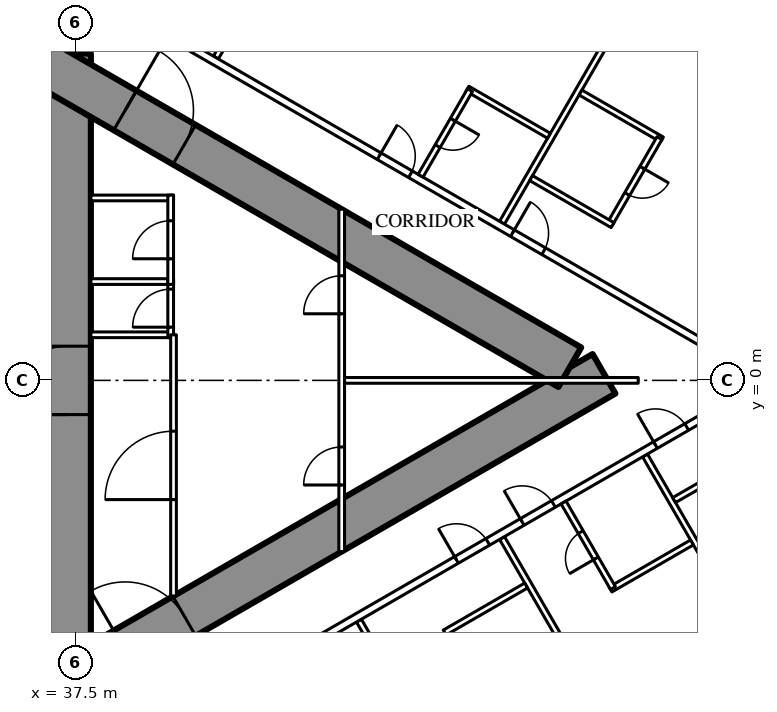
"""IFC4 building model, lengths in metres.
Left out: names, types, materials, properties, quantities, classifications, styles, units other than length and angle.
Written with IfcOpenShell. Run it as: python <this file> out.ifc"""

import sys

from ifc_helpers import new_model, si_unit, direction, frame, frame_2d, origin, place, context, subcontext, project, spatial, rectangle, extrude, element, fill, save


model = new_model("IFC4")
c1 = context("Model", 3, precision=1e-05, world=origin(), true_north=direction((0.0, 1.0)))
c2 = subcontext(c1, "Body", "Model", "MODEL_VIEW")
j1 = project(units=[si_unit("LENGTHUNIT", "METRE"), si_unit("PLANEANGLEUNIT", "RADIAN")], contexts=[c1])
p1 = place(None, origin())
s1 = spatial("IfcSite", under=j1, at=p1, CompositionType="ELEMENT")
p2 = place(p1, origin())
s2 = spatial("IfcBuilding", under=s1, at=p2, CompositionType="ELEMENT")
p3 = place(p2, frame((0.0, 0.0, 94.1)))
s3 = spatial("IfcBuildingStorey", under=s2, at=p3, CompositionType="ELEMENT", Elevation=94.1)
p4 = place(p3, frame((37.3, -8.6, 0.0), z_axis=(0.0, 0.0, 1.0), x_axis=(0.0, 1.0, 0.0)))
e1 = element("IfcWall", 1, at=p4, inside=s3, PredefinedType="SHEAR", context=c2, shape_type="SweptSolid", body=[
    extrude(rectangle(XDim=17.2, YDim=1.2, at=frame_2d((8.6, 0.0))), origin(), (0.0, 0.0, 1.0), 3.5),
])
p5 = place(p4, frame((7.7, 0.0, 0.0)))
e2 = element("IfcOpeningElement", 2, at=p5, cuts=e1, PredefinedType="OPENING", context=c2, shape_type="SweptSolid", body=[
    extrude(rectangle(XDim=1.8, YDim=2.2, at=frame_2d((0.9, 1.1))), frame((0.0, 0.61, 0.0), z_axis=(0.0, -1.0, 0.0), x_axis=(1.0, 0.0, 0.0)), (0.0, 0.0, 1.0), 1.22),
])
p6 = place(p3, frame((27.2, -13.8, 0.0), z_axis=(0.0, 0.0, 1.0), x_axis=(0.866027159892, 0.499996958321, 0.0)))
e3 = element("IfcWall", 3, at=p6, inside=s3, PredefinedType="SHEAR", context=c2, shape_type="SweptSolid", body=[
    extrude(rectangle(XDim=27.947, YDim=1.2, at=frame_2d((13.973, 0.0))), origin(), (0.0, 0.0, 1.0), 3.5),
])
p7 = place(p6, frame((4.6, 0.0, 0.0)))
e4 = element("IfcOpeningElement", 4, at=p7, cuts=e3, PredefinedType="OPENING", context=c2, shape_type="SweptSolid", body=[
    extrude(rectangle(XDim=1.0, YDim=2.2, at=frame_2d((0.5, 1.1))), frame((0.0, 0.61, 0.0), z_axis=(0.0, -1.0, 0.0), x_axis=(1.0, 0.0, 0.0)), (0.0, 0.0, 1.0), 1.22),
])
p8 = place(p6, frame((13.395, 0.0, 0.0)))
e5 = element("IfcOpeningElement", 5, at=p8, cuts=e3, PredefinedType="OPENING", context=c2, shape_type="SweptSolid", body=[
    extrude(rectangle(XDim=1.8, YDim=2.2, at=frame_2d((0.9, 1.1))), frame((0.0, 0.61, 0.0), z_axis=(0.0, -1.0, 0.0), x_axis=(1.0, 0.0, 0.0)), (0.0, 0.0, 1.0), 1.22),
])
p9 = place(p3, frame((27.2, 13.8, 0.0), z_axis=(0.0, 0.0, 1.0), x_axis=(0.866024515034, -0.500001539357, 0.0)))
e6 = element("IfcWall", 6, at=p9, inside=s3, PredefinedType="SHEAR", context=c2, shape_type="SweptSolid", body=[
    extrude(rectangle(XDim=26.907, YDim=1.2, at=frame_2d((13.454, 0.0))), origin(), (0.0, 0.0, 1.0), 3.5),
])
p10 = place(p9, frame((4.6, 0.0, 0.0)))
e7 = element("IfcOpeningElement", 7, at=p10, cuts=e6, PredefinedType="OPENING", context=c2, shape_type="SweptSolid", body=[
    extrude(rectangle(XDim=1.0, YDim=2.2, at=frame_2d((0.5, 1.1))), frame((0.0, 0.61, 0.0), z_axis=(0.0, -1.0, 0.0), x_axis=(1.0, 0.0, 0.0)), (0.0, 0.0, 1.0), 1.22),
])
p11 = place(p9, frame((13.395, 0.0, 0.0)))
e8 = element("IfcOpeningElement", 8, at=p11, cuts=e6, PredefinedType="OPENING", context=c2, shape_type="SweptSolid", body=[
    extrude(rectangle(XDim=1.8, YDim=2.2, at=frame_2d((0.9, 1.1))), frame((0.0, 0.61, 0.0), z_axis=(0.0, -1.0, 0.0), x_axis=(1.0, 0.0, 0.0)), (0.0, 0.0, 1.0), 1.22),
])
p12 = place(p3, frame((44.954, -6.321, 0.0), z_axis=(0.0, 0.0, 1.0), x_axis=(0.500018676722, -0.866014620505, 0.0)))
e9 = element("IfcWall", 9, at=p12, inside=s3, PredefinedType="PARTITIONING", context=c2, shape_type="SweptSolid", body=[
    extrude(rectangle(XDim=8.704, YDim=0.15, at=frame_2d((4.352, 0.0))), origin(), (0.0, 0.0, 1.0), 2.2),
])
p13 = place(p3, frame((48.719, -4.147, 0.0), z_axis=(0.0, 0.0, 1.0), x_axis=(0.499990498062, -0.866030889661, 0.0)))
e10 = element("IfcWall", 10, at=p13, inside=s3, PredefinedType="PARTITIONING", context=c2, shape_type="SweptSolid", body=[
    extrude(rectangle(XDim=11.406, YDim=0.15, at=frame_2d((5.703, 0.0))), origin(), (0.0, 0.0, 1.0), 3.25),
])
p14 = place(p3, frame((52.481, -1.975, 0.0), z_axis=(0.0, 0.0, 1.0), x_axis=(0.500003867771, -0.866023170714, 0.0)))
e11 = element("IfcWall", 11, at=p14, inside=s3, PredefinedType="PARTITIONING", context=c2, shape_type="SweptSolid", body=[
    extrude(rectangle(XDim=11.265, YDim=0.15, at=frame_2d((5.632, 0.0))), origin(), (0.0, 0.0, 1.0), 3.25),
])
p15 = place(p3, frame((41.19, 8.494, 0.0), z_axis=(0.0, 0.0, 1.0), x_axis=(0.49999258054, 0.866029687369, 0.0)))
e12 = element("IfcWall", 12, at=p15, inside=s3, PredefinedType="PARTITIONING", context=c2, shape_type="SweptSolid", body=[
    extrude(rectangle(XDim=11.318, YDim=0.15, at=frame_2d((5.659, 0.0))), origin(), (0.0, 0.0, 1.0), 3.25),
])
p16 = place(p3, frame((48.719, 4.147, 0.0), z_axis=(0.0, 0.0, 1.0), x_axis=(0.499993328235, 0.866029255696, 0.0)))
e13 = element("IfcWall", 13, at=p16, inside=s3, PredefinedType="PARTITIONING", context=c2, shape_type="SweptSolid", body=[
    extrude(rectangle(XDim=8.686, YDim=0.15, at=frame_2d((4.343, 0.0))), origin(), (0.0, 0.0, 1.0), 2.2),
])
p17 = place(p3, frame((37.96, -10.243, 0.0), z_axis=(0.0, 0.0, 1.0), x_axis=(0.866026429433, 0.499998223521, 0.0)))
e14 = element("IfcWall", 14, at=p17, inside=s3, PredefinedType="PARTITIONING", context=c2, shape_type="SweptSolid", body=[
    extrude(rectangle(XDim=20.487, YDim=0.2, at=frame_2d((10.243, 0.0))), origin(), (0.0, 0.0, 1.0), 3.25),
])
p18 = place(p17, frame((4.047, 0.0, 0.0)))
e15 = element("IfcOpeningElement", 15, at=p18, cuts=e14, PredefinedType="OPENING", context=c2, shape_type="SweptSolid", body=[
    extrude(rectangle(XDim=0.95, YDim=2.2, at=frame_2d((0.475, 1.1))), frame((0.0, 0.11, 0.0), z_axis=(0.0, -1.0, 0.0), x_axis=(1.0, 0.0, 0.0)), (0.0, 0.0, 1.0), 0.22),
])
p19 = place(p17, frame((11.04, 0.0, 0.0)))
e16 = element("IfcOpeningElement", 16, at=p19, cuts=e14, PredefinedType="OPENING", context=c2, shape_type="SweptSolid", body=[
    extrude(rectangle(XDim=0.95, YDim=2.2, at=frame_2d((0.475, 1.1))), frame((0.0, 0.11, 0.0), z_axis=(0.0, -1.0, 0.0), x_axis=(1.0, 0.0, 0.0)), (0.0, 0.0, 1.0), 0.22),
])
p20 = place(p17, frame((13.035, 0.0, 0.0)))
e17 = element("IfcOpeningElement", 17, at=p20, cuts=e14, PredefinedType="OPENING", context=c2, shape_type="SweptSolid", body=[
    extrude(rectangle(XDim=0.95, YDim=2.2, at=frame_2d((0.475, 1.1))), frame((0.0, 0.11, 0.0), z_axis=(0.0, -1.0, 0.0), x_axis=(1.0, 0.0, 0.0)), (0.0, 0.0, 1.0), 0.22),
])
p21 = place(p17, frame((17.085, 0.0, 0.0)))
e18 = element("IfcOpeningElement", 18, at=p21, cuts=e14, PredefinedType="OPENING", context=c2, shape_type="SweptSolid", body=[
    extrude(rectangle(XDim=0.95, YDim=2.2, at=frame_2d((0.475, 1.1))), frame((0.0, 0.11, 0.0), z_axis=(0.0, -1.0, 0.0), x_axis=(1.0, 0.0, 0.0)), (0.0, 0.0, 1.0), 0.22),
])
p22 = place(p17, frame((1.048, 0.0, 0.0)))
e19 = element("IfcOpeningElement", 19, at=p22, cuts=e14, PredefinedType="OPENING", context=c2, shape_type="SweptSolid", body=[
    extrude(rectangle(XDim=1.8, YDim=2.2, at=frame_2d((0.9, 1.1))), frame((0.0, 0.11, 0.0), z_axis=(0.0, -1.0, 0.0), x_axis=(1.0, 0.0, 0.0)), (0.0, 0.0, 1.0), 0.22),
])
p23 = place(p3, frame((36.834, 10.894, 0.0), z_axis=(0.0, 0.0, 1.0), x_axis=(0.866028157229, -0.499995230863, 0.0)))
e20 = element("IfcWall", 20, at=p23, inside=s3, PredefinedType="PARTITIONING", context=c2, shape_type="SweptSolid", body=[
    extrude(rectangle(XDim=21.667, YDim=0.2, at=frame_2d((10.833, 0.0))), origin(), (0.0, 0.0, 1.0), 3.25),
])
p24 = place(p23, frame((14.04, 0.0, 0.0)))
e21 = element("IfcOpeningElement", 21, at=p24, cuts=e20, PredefinedType="OPENING", context=c2, shape_type="SweptSolid", body=[
    extrude(rectangle(XDim=0.95, YDim=2.2, at=frame_2d((0.475, 1.1))), frame((0.0, 0.11, 0.0), z_axis=(0.0, -1.0, 0.0), x_axis=(1.0, 0.0, 0.0)), (0.0, 0.0, 1.0), 0.22),
])
p25 = place(p23, frame((9.99, 0.0, 0.0)))
e22 = element("IfcOpeningElement", 22, at=p25, cuts=e20, PredefinedType="OPENING", context=c2, shape_type="SweptSolid", body=[
    extrude(rectangle(XDim=0.95, YDim=2.2, at=frame_2d((0.475, 1.1))), frame((0.0, 0.11, 0.0), z_axis=(0.0, -1.0, 0.0), x_axis=(1.0, 0.0, 0.0)), (0.0, 0.0, 1.0), 0.22),
])
p26 = place(p23, frame((3.35, 0.0, 0.0)))
e23 = element("IfcOpeningElement", 23, at=p26, cuts=e20, PredefinedType="OPENING", context=c2, shape_type="SweptSolid", body=[
    extrude(rectangle(XDim=1.0, YDim=2.2, at=frame_2d((0.5, 1.1))), frame((0.0, 0.11, 0.0), z_axis=(0.0, -1.0, 0.0), x_axis=(1.0, 0.0, 0.0)), (0.0, 0.0, 1.0), 0.22),
])
p27 = place(p3, frame((47.275, -6.597, 0.0), z_axis=(0.0, 0.0, 1.0), x_axis=(0.499936506574, -0.866062058628, 0.0)))
e24 = element("IfcWall", 24, at=p27, inside=s3, PredefinedType="PARTITIONING", context=c2, shape_type="SweptSolid", body=[
    extrude(rectangle(XDim=2.6, YDim=0.15, at=frame_2d((1.3, 0.0))), origin(), (0.0, 0.0, 1.0), 3.25),
])
p28 = place(p27, frame((0.9, 0.0, 0.0)))
e25 = element("IfcOpeningElement", 25, at=p28, cuts=e24, PredefinedType="OPENING", context=c2, shape_type="SweptSolid", body=[
    extrude(rectangle(XDim=0.8, YDim=2.2, at=frame_2d((0.4, 1.1))), frame((0.0, 0.085, 0.0), z_axis=(0.0, -1.0, 0.0), x_axis=(1.0, 0.0, 0.0)), (0.0, 0.0, 1.0), 0.17),
])
for number, where, z_axis, x_axis in (
    (26, (47.21, -6.635, 0.0), (0.0, 0.0, 1.0), (0.866, 0.5, 0.0)),
    (27, (51.573, -5.502, 0.0), (0.0, 0.0, 1.0), (0.866, 0.5, 0.0)),
):
    element("IfcWall", number, at=place(p3, frame(where, z_axis=z_axis, x_axis=x_axis)), inside=s3, PredefinedType="PARTITIONING", context=c2, shape_type="SweptSolid", body=[
        extrude(rectangle(XDim=2.475, YDim=0.15, at=frame_2d((1.237, 0.0))), origin(), (0.0, 0.0, 1.0), 3.25),
    ])
p29 = place(p3, frame((50.338, -3.213, 0.0), z_axis=(0.0, 0.0, 1.0), x_axis=(0.500047596559, -0.865997922154, 0.0)))
e28 = element("IfcWall", 28, at=p29, inside=s3, PredefinedType="PARTITIONING", context=c2, shape_type="SweptSolid", body=[
    extrude(rectangle(XDim=2.6, YDim=0.15, at=frame_2d((1.3, 0.0))), origin(), (0.0, 0.0, 1.0), 3.25),
])
p30 = place(p29, frame((0.9, 0.0, 0.0)))
e29 = element("IfcOpeningElement", 29, at=p30, cuts=e28, PredefinedType="OPENING", context=c2, shape_type="SweptSolid", body=[
    extrude(rectangle(XDim=0.8, YDim=2.2, at=frame_2d((0.4, 1.1))), frame((0.0, 0.085, 0.0), z_axis=(0.0, -1.0, 0.0), x_axis=(1.0, 0.0, 0.0)), (0.0, 0.0, 1.0), 0.17),
])
for number, where, z_axis, x_axis in (
    (30, (53.246, -3.15, 0.0), (0.0, 0.0, 1.0), (0.866, 0.5, 0.0)),
    (31, (50.783, 7.574, 0.0), (0.0, 0.0, 1.0), (0.866, -0.5, 0.0)),
):
    element("IfcWall", number, at=place(p3, frame(where, z_axis=z_axis, x_axis=x_axis)), inside=s3, PredefinedType="PARTITIONING", context=c2, shape_type="SweptSolid", body=[
        extrude(rectangle(XDim=2.475, YDim=0.15, at=frame_2d((1.237, 0.0))), origin(), (0.0, 0.0, 1.0), 3.25),
    ])
p31 = place(p3, frame((51.562, 4.123, 0.0), z_axis=(0.0, 0.0, 1.0), x_axis=(0.49997716683, 0.86603858612, 0.0)))
e32 = element("IfcWall", 32, at=p31, inside=s3, PredefinedType="PARTITIONING", context=c2, shape_type="SweptSolid", body=[
    extrude(rectangle(XDim=2.6, YDim=0.15, at=frame_2d((1.3, 0.0))), origin(), (0.0, 0.0, 1.0), 3.25),
])
p32 = place(p31, frame((0.9, 0.0, 0.0)))
e33 = element("IfcOpeningElement", 33, at=p32, cuts=e32, PredefinedType="OPENING", context=c2, shape_type="SweptSolid", body=[
    extrude(rectangle(XDim=0.8, YDim=2.2, at=frame_2d((0.4, 1.1))), frame((0.0, 0.085, 0.0), z_axis=(0.0, -1.0, 0.0), x_axis=(1.0, 0.0, 0.0)), (0.0, 0.0, 1.0), 0.17),
])
for number, where, z_axis, x_axis in (
    (34, (49.483, 5.323, 0.0), (0.0, 0.0, 1.0), (0.866, -0.5, 0.0)),
    (35, (47.81, 7.674, 0.0), (0.0, 0.0, 1.0), (0.866, -0.5, 0.0)),
):
    element("IfcWall", number, at=place(p3, frame(where, z_axis=z_axis, x_axis=x_axis)), inside=s3, PredefinedType="PARTITIONING", context=c2, shape_type="SweptSolid", body=[
        extrude(rectangle(XDim=2.475, YDim=0.15, at=frame_2d((1.238, 0.0))), origin(), (0.0, 0.0, 1.0), 3.25),
    ])
p33 = place(p3, frame((46.575, 5.385, 0.0), z_axis=(0.0, 0.0, 1.0), x_axis=(0.500006934395, 0.866021400173, 0.0)))
e36 = element("IfcWall", 36, at=p33, inside=s3, PredefinedType="PARTITIONING", context=c2, shape_type="SweptSolid", body=[
    extrude(rectangle(XDim=2.6, YDim=0.15, at=frame_2d((1.3, 0.0))), origin(), (0.0, 0.0, 1.0), 3.25),
])
p34 = place(p33, frame((0.9, 0.0, 0.0)))
e37 = element("IfcOpeningElement", 37, at=p34, cuts=e36, PredefinedType="OPENING", context=c2, shape_type="SweptSolid", body=[
    extrude(rectangle(XDim=0.8, YDim=2.2, at=frame_2d((0.4, 1.1))), frame((0.0, 0.085, 0.0), z_axis=(0.0, -1.0, 0.0), x_axis=(1.0, 0.0, 0.0)), (0.0, 0.0, 1.0), 0.17),
])
for number, where, z_axis, x_axis in (
    (38, (37.9, 1.2, 0.0), (0.0, 0.0, 1.0), (1.0, 0.0, 0.0)),
    (39, (37.9, 2.6, 0.0), (0.0, 0.0, 1.0), (1.0, 0.0, 0.0)),
    (40, (37.9, 4.8, 0.0), (0.0, 0.0, 1.0), (1.0, 0.0, 0.0)),
):
    element("IfcWall", number, at=place(p3, frame(where, z_axis=z_axis, x_axis=x_axis)), inside=s3, PredefinedType="PARTITIONING", context=c2, shape_type="SweptSolid", body=[
        extrude(rectangle(XDim=2.175, YDim=0.15, at=frame_2d((1.087, 0.0))), origin(), (0.0, 0.0, 1.0), 3.25),
    ])
p35 = place(p3, frame((40.0, 1.125, 0.0), z_axis=(0.0, 0.0, 1.0), x_axis=(0.0, 1.0, 0.0)))
e41 = element("IfcWall", 41, at=p35, inside=s3, PredefinedType="PARTITIONING", context=c2, shape_type="SweptSolid", body=[
    extrude(rectangle(XDim=1.55, YDim=0.15, at=frame_2d((0.775, 0.0))), origin(), (0.0, 0.0, 1.0), 3.25),
])
p36 = place(p35, frame((0.275, 0.0, 0.0)))
e42 = element("IfcOpeningElement", 42, at=p36, cuts=e41, PredefinedType="OPENING", context=c2, shape_type="SweptSolid", body=[
    extrude(rectangle(XDim=1.0, YDim=2.2, at=frame_2d((0.5, 1.1))), frame((0.0, 0.085, 0.0), z_axis=(0.0, -1.0, 0.0), x_axis=(1.0, 0.0, 0.0)), (0.0, 0.0, 1.0), 0.17),
])
p37 = place(p3, frame((40.0, 2.525, 0.0), z_axis=(0.0, 0.0, 1.0), x_axis=(0.0, 1.0, 0.0)))
e43 = element("IfcWall", 43, at=p37, inside=s3, PredefinedType="PARTITIONING", context=c2, shape_type="SweptSolid", body=[
    extrude(rectangle(XDim=2.35, YDim=0.15, at=frame_2d((1.175, 0.0))), origin(), (0.0, 0.0, 1.0), 3.25),
])
p38 = place(p37, frame((0.675, 0.0, 0.0)))
e44 = element("IfcOpeningElement", 44, at=p38, cuts=e43, PredefinedType="OPENING", context=c2, shape_type="SweptSolid", body=[
    extrude(rectangle(XDim=1.0, YDim=2.2, at=frame_2d((0.5, 1.1))), frame((0.0, 0.085, 0.0), z_axis=(0.0, -1.0, 0.0), x_axis=(1.0, 0.0, 0.0)), (0.0, 0.0, 1.0), 0.17),
])
p39 = place(p3, frame((40.075, -5.674, 0.0), z_axis=(0.0, 0.0, 1.0), x_axis=(0.0, 1.0, 0.0)))
e45 = element("IfcWall", 45, at=p39, inside=s3, PredefinedType="PARTITIONING", context=c2, shape_type="SweptSolid", body=[
    extrude(rectangle(XDim=6.874, YDim=0.15, at=frame_2d((3.437, 0.0))), origin(), (0.0, 0.0, 1.0), 3.25),
])
p40 = place(p39, frame((2.537, 0.0, 0.0)))
e46 = element("IfcOpeningElement", 46, at=p40, cuts=e45, PredefinedType="OPENING", context=c2, shape_type="SweptSolid", body=[
    extrude(rectangle(XDim=1.8, YDim=2.2, at=frame_2d((0.9, 1.1))), frame((0.0, 0.085, 0.0), z_axis=(0.0, -1.0, 0.0), x_axis=(1.0, 0.0, 0.0)), (0.0, 0.0, 1.0), 0.17),
])
p41 = place(p3, frame((44.5, -4.505, 0.0), z_axis=(0.0, 0.0, 1.0), x_axis=(0.0, 1.0, 0.0)))
e47 = element("IfcWall", 47, at=p41, inside=s3, PredefinedType="PARTITIONING", context=c2, shape_type="SweptSolid", body=[
    extrude(rectangle(XDim=9.009, YDim=0.15, at=frame_2d((4.505, 0.0))), origin(), (0.0, 0.0, 1.0), 2.45),
])
p42 = place(p41, frame((1.752, 0.0, 0.0)))
e48 = element("IfcOpeningElement", 48, at=p42, cuts=e47, PredefinedType="OPENING", context=c2, shape_type="SweptSolid", body=[
    extrude(rectangle(XDim=1.0, YDim=2.2, at=frame_2d((0.5, 1.1))), frame((0.0, 0.085, 0.0), z_axis=(0.0, -1.0, 0.0), x_axis=(1.0, 0.0, 0.0)), (0.0, 0.0, 1.0), 0.17),
])
p43 = place(p41, frame((6.257, 0.0, 0.0)))
e49 = element("IfcOpeningElement", 49, at=p43, cuts=e47, PredefinedType="OPENING", context=c2, shape_type="SweptSolid", body=[
    extrude(rectangle(XDim=1.0, YDim=2.2, at=frame_2d((0.5, 1.1))), frame((0.0, 0.085, 0.0), z_axis=(0.0, -1.0, 0.0), x_axis=(1.0, 0.0, 0.0)), (0.0, 0.0, 1.0), 0.17),
])
p44 = place(p3, frame((44.575, 0.0, 0.0), z_axis=(0.0, 0.0, 1.0), x_axis=(1.0, 0.0, 0.0)))
e50 = element("IfcWall", 50, at=p44, inside=s3, PredefinedType="PARTITIONING", context=c2, shape_type="SweptSolid", body=[
    extrude(rectangle(XDim=7.727, YDim=0.15, at=frame_2d((3.864, 0.0))), origin(), (0.0, 0.0, 1.0), 2.2),
])
p45 = place(p19, origin())
e51 = element("IfcDoor", 51, at=p45, inside=s3, OperationType="SINGLE_SWING_LEFT", PredefinedType="DOOR", context=c2, shape_type="SweptSolid", body=[
    extrude(rectangle(XDim=0.95, YDim=2.2, at=frame_2d((0.475, 1.1))), frame((0.0, 0.025, 0.0), z_axis=(0.0, -1.0, 0.0), x_axis=(1.0, 0.0, 0.0)), (0.0, 0.0, 1.0), 0.05),
])
fill(e16, e51)
p46 = place(p30, origin())
e52 = element("IfcDoor", 52, at=p46, inside=s3, OperationType="SINGLE_SWING_RIGHT", PredefinedType="DOOR", context=c2, shape_type="SweptSolid", body=[
    extrude(rectangle(XDim=0.8, YDim=2.2, at=frame_2d((0.4, 1.1))), frame((0.0, 0.025, 0.0), z_axis=(0.0, -1.0, 0.0), x_axis=(1.0, 0.0, 0.0)), (0.0, 0.0, 1.0), 0.05),
])
fill(e29, e52)
p47 = place(p20, origin())
e53 = element("IfcDoor", 53, at=p47, inside=s3, OperationType="SINGLE_SWING_LEFT", PredefinedType="DOOR", context=c2, shape_type="SweptSolid", body=[
    extrude(rectangle(XDim=0.95, YDim=2.2, at=frame_2d((0.475, 1.1))), frame((0.0, 0.025, 0.0), z_axis=(0.0, -1.0, 0.0), x_axis=(1.0, 0.0, 0.0)), (0.0, 0.0, 1.0), 0.05),
])
fill(e17, e53)
p48 = place(p21, origin())
e54 = element("IfcDoor", 54, at=p48, inside=s3, OperationType="SINGLE_SWING_LEFT", PredefinedType="DOOR", context=c2, shape_type="SweptSolid", body=[
    extrude(rectangle(XDim=0.95, YDim=2.2, at=frame_2d((0.475, 1.1))), frame((0.0, 0.025, 0.0), z_axis=(0.0, -1.0, 0.0), x_axis=(1.0, 0.0, 0.0)), (0.0, 0.0, 1.0), 0.05),
])
fill(e18, e54)
p49 = place(p32, origin())
e55 = element("IfcDoor", 55, at=p49, inside=s3, OperationType="SINGLE_SWING_RIGHT", PredefinedType="DOOR", context=c2, shape_type="SweptSolid", body=[
    extrude(rectangle(XDim=0.8, YDim=2.2, at=frame_2d((0.4, 1.1))), frame((0.0, 0.025, 0.0), z_axis=(0.0, -1.0, 0.0), x_axis=(1.0, 0.0, 0.0)), (0.0, 0.0, 1.0), 0.05),
])
fill(e33, e55)
p50 = place(p24, origin())
e56 = element("IfcDoor", 56, at=p50, inside=s3, OperationType="SINGLE_SWING_LEFT", PredefinedType="DOOR", context=c2, shape_type="SweptSolid", body=[
    extrude(rectangle(XDim=0.95, YDim=2.2, at=frame_2d((0.475, 1.1))), frame((0.0, 0.025, 0.0), z_axis=(0.0, -1.0, 0.0), x_axis=(1.0, 0.0, 0.0)), (0.0, 0.0, 1.0), 0.05),
])
fill(e21, e56)
p51 = place(p34, origin())
e57 = element("IfcDoor", 57, at=p51, inside=s3, OperationType="SINGLE_SWING_RIGHT", PredefinedType="DOOR", context=c2, shape_type="SweptSolid", body=[
    extrude(rectangle(XDim=0.8, YDim=2.2, at=frame_2d((0.4, 1.1))), frame((0.0, 0.025, 0.0), z_axis=(0.0, -1.0, 0.0), x_axis=(1.0, 0.0, 0.0)), (0.0, 0.0, 1.0), 0.05),
])
fill(e37, e57)
p52 = place(p25, origin())
e58 = element("IfcDoor", 58, at=p52, inside=s3, OperationType="SINGLE_SWING_LEFT", PredefinedType="DOOR", context=c2, shape_type="SweptSolid", body=[
    extrude(rectangle(XDim=0.95, YDim=2.2, at=frame_2d((0.475, 1.1))), frame((0.0, 0.025, 0.0), z_axis=(0.0, -1.0, 0.0), x_axis=(1.0, 0.0, 0.0)), (0.0, 0.0, 1.0), 0.05),
])
fill(e22, e58)
p53 = place(p36, origin())
e59 = element("IfcDoor", 59, at=p53, inside=s3, OperationType="SINGLE_SWING_LEFT", PredefinedType="DOOR", context=c2, shape_type="SweptSolid", body=[
    extrude(rectangle(XDim=1.0, YDim=2.2, at=frame_2d((0.5, 1.1))), frame((0.0, 0.025, 0.0), z_axis=(0.0, -1.0, 0.0), x_axis=(1.0, 0.0, 0.0)), (0.0, 0.0, 1.0), 0.05),
])
fill(e42, e59)
p54 = place(p38, origin())
e60 = element("IfcDoor", 60, at=p54, inside=s3, OperationType="SINGLE_SWING_LEFT", PredefinedType="DOOR", context=c2, shape_type="SweptSolid", body=[
    extrude(rectangle(XDim=1.0, YDim=2.2, at=frame_2d((0.5, 1.1))), frame((0.0, 0.025, 0.0), z_axis=(0.0, -1.0, 0.0), x_axis=(1.0, 0.0, 0.0)), (0.0, 0.0, 1.0), 0.05),
])
fill(e44, e60)
p55 = place(p40, origin())
e61 = element("IfcDoor", 61, at=p55, inside=s3, OperationType="DOUBLE_DOOR_SINGLE_SWING", PredefinedType="DOOR", context=c2, shape_type="SweptSolid", body=[
    extrude(rectangle(XDim=1.8, YDim=2.2, at=frame_2d((0.9, 1.1))), frame((0.0, 0.025, 0.0), z_axis=(0.0, -1.0, 0.0), x_axis=(1.0, 0.0, 0.0)), (0.0, 0.0, 1.0), 0.05),
])
fill(e46, e61)
p56 = place(p42, origin())
e62 = element("IfcDoor", 62, at=p56, inside=s3, OperationType="SINGLE_SWING_LEFT", PredefinedType="DOOR", context=c2, shape_type="SweptSolid", body=[
    extrude(rectangle(XDim=1.0, YDim=2.2, at=frame_2d((0.5, 1.1))), frame((0.0, 0.025, 0.0), z_axis=(0.0, -1.0, 0.0), x_axis=(1.0, 0.0, 0.0)), (0.0, 0.0, 1.0), 0.05),
])
fill(e48, e62)
p57 = place(p43, origin())
e63 = element("IfcDoor", 63, at=p57, inside=s3, OperationType="SINGLE_SWING_LEFT", PredefinedType="DOOR", context=c2, shape_type="SweptSolid", body=[
    extrude(rectangle(XDim=1.0, YDim=2.2, at=frame_2d((0.5, 1.1))), frame((0.0, 0.025, 0.0), z_axis=(0.0, -1.0, 0.0), x_axis=(1.0, 0.0, 0.0)), (0.0, 0.0, 1.0), 0.05),
])
fill(e49, e63)
p58 = place(p8, origin())
e64 = element("IfcDoor", 64, at=p58, inside=s3, OperationType="DOUBLE_DOOR_SINGLE_SWING", PredefinedType="DOOR", context=c2, shape_type="SweptSolid", body=[
    extrude(rectangle(XDim=1.8, YDim=2.2, at=frame_2d((0.9, 1.1))), frame((0.0, 0.025, 0.0), z_axis=(0.0, -1.0, 0.0), x_axis=(1.0, 0.0, 0.0)), (0.0, 0.0, 1.0), 0.05),
])
fill(e5, e64)
p59 = place(p11, origin())
e65 = element("IfcDoor", 65, at=p59, inside=s3, OperationType="DOUBLE_DOOR_SINGLE_SWING", PredefinedType="DOOR", context=c2, shape_type="SweptSolid", body=[
    extrude(rectangle(XDim=1.8, YDim=2.2, at=frame_2d((0.9, 1.1))), frame((0.0, 0.025, 0.0), z_axis=(0.0, -1.0, 0.0), x_axis=(1.0, 0.0, 0.0)), (0.0, 0.0, 1.0), 0.05),
])
fill(e8, e65)
p60 = place(p5, origin())
e66 = element("IfcDoor", 66, at=p60, inside=s3, OperationType="DOUBLE_DOOR_SINGLE_SWING", PredefinedType="DOOR", context=c2, shape_type="SweptSolid", body=[
    extrude(rectangle(XDim=1.8, YDim=2.2, at=frame_2d((0.9, 1.1))), frame((0.0, 0.025, 0.0), z_axis=(0.0, -1.0, 0.0), x_axis=(1.0, 0.0, 0.0)), (0.0, 0.0, 1.0), 0.05),
])
fill(e2, e66)
save(model, sys.argv[1])
